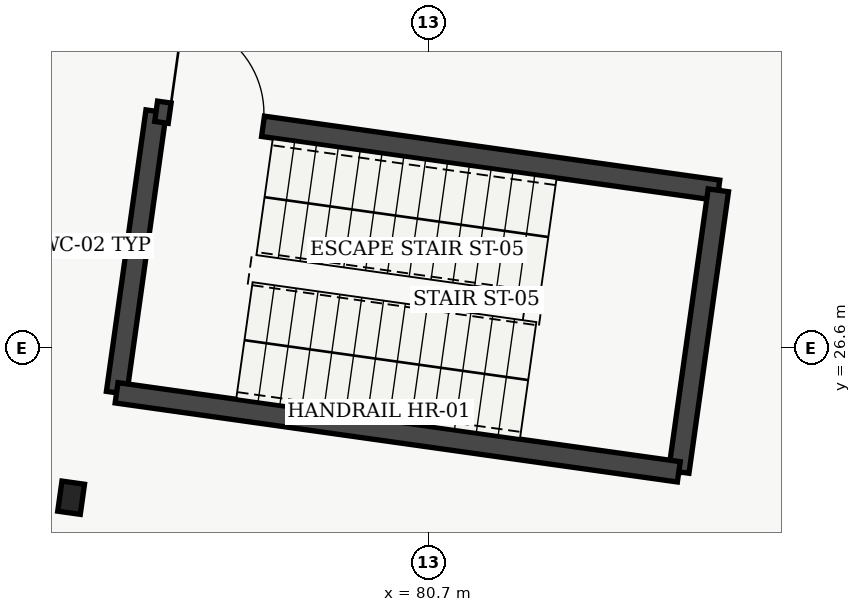
"""IFC4 building model, lengths in metres.
Left out: names, types, materials, properties, quantities, classifications, styles, units other than length and angle.
Written with IfcOpenShell. Run it as: python <this file> out.ifc"""

import sys

from ifc_helpers import new_model, si_unit, direction, frame, frame_2d, origin, origin_2d, place, context, subcontext, project, spatial, rectangle, i_section, extrude, element, fill, save


model = new_model("IFC4")
c1 = context("Model", 3, precision=1e-05, world=origin(), true_north=direction((0.0, 1.0)))
c2 = subcontext(c1, "Body", "Model", "MODEL_VIEW")
j1 = project(units=[si_unit("LENGTHUNIT", "METRE"), si_unit("PLANEANGLEUNIT", "RADIAN")], contexts=[c1])
p1 = place(None, origin())
s1 = spatial("IfcSite", under=j1, at=p1, CompositionType="ELEMENT")
p2 = place(p1, origin())
s2 = spatial("IfcBuilding", under=s1, at=p2, CompositionType="ELEMENT")
p3 = place(p2, frame((0.0, 0.0, -4.8)))
s3 = spatial("IfcBuildingStorey", under=s2, at=p3, CompositionType="ELEMENT", Elevation=-4.8)
p4 = place(p3, frame((76.002, 24.63, 0.0), z_axis=(0.0, 0.0, 1.0), x_axis=(0.990268068742, -0.13917310096, 0.0)))
e1 = element("IfcColumn", 1, at=p4, inside=s3, PredefinedType="COLUMN", context=c2, shape_type="SweptSolid", body=[
    extrude(i_section(OverallWidth=0.3, OverallDepth=0.4, WebThickness=0.013, FlangeThickness=0.024, at=origin_2d()), origin(), (0.0, 0.0, 1.0), 4.61),
])
p5 = place(p3, frame((76.6, 26.01, 0.0), z_axis=(0.0, 0.0, 1.0), x_axis=(0.139172815303, 0.990268108888, 0.0)))
e2 = element("IfcWall", 2, at=p5, inside=s3, PredefinedType="SHEAR", context=c2, shape_type="SweptSolid", body=[
    extrude(rectangle(XDim=3.74, YDim=0.27, at=frame_2d((1.87, 0.0))), origin(), (0.0, 0.0, 1.0), 4.58),
])
p6 = place(p3, frame((77.12, 29.714, 0.0), z_axis=(0.0, 0.0, 1.0), x_axis=(0.990265308789, -0.139192737628, 0.0)))
e3 = element("IfcWall", 3, at=p6, inside=s3, PredefinedType="SHEAR", context=c2, shape_type="SweptSolid", body=[
    extrude(rectangle(XDim=7.47, YDim=0.27, at=frame_2d((3.735, 0.0))), origin(), (0.0, 0.0, 1.0), 4.58),
])
p7 = place(p6, frame((0.18, 0.0, 0.0)))
e4 = element("IfcOpeningElement", 4, at=p7, cuts=e3, PredefinedType="OPENING", context=c2, shape_type="SweptSolid", body=[
    extrude(rectangle(XDim=1.24, YDim=2.15, at=frame_2d((0.62, 1.075))), frame((0.0, 0.135, 0.0), z_axis=(0.0, -1.0, 0.0), x_axis=(1.0, 0.0, 0.0)), (0.0, 0.0, 1.0), 0.27),
])
p8 = place(p3, frame((84.518, 28.674, 0.0), z_axis=(0.0, 0.0, 1.0), x_axis=(-0.139172815303, -0.990268108888, 0.0)))
e5 = element("IfcWall", 5, at=p8, inside=s3, PredefinedType="SHEAR", context=c2, shape_type="SweptSolid", body=[
    extrude(rectangle(XDim=3.74, YDim=0.27, at=frame_2d((1.87, 0.0))), origin(), (0.0, 0.0, 1.0), 4.58),
])
p9 = place(p3, frame((83.997, 24.97, 0.0), z_axis=(0.0, 0.0, 1.0), x_axis=(-0.990265308789, 0.139192737628, 0.0)))
e6 = element("IfcWall", 6, at=p9, inside=s3, PredefinedType="SHEAR", context=c2, shape_type="SweptSolid", body=[
    extrude(rectangle(XDim=7.47, YDim=0.27, at=frame_2d((3.735, 0.0))), origin(), (0.0, 0.0, 1.0), 4.58),
])
p10 = place(p7, origin())
e7 = element("IfcDoor", 7, at=p10, inside=s3, OperationType="SINGLE_SWING_LEFT", PredefinedType="DOOR", context=c2, shape_type="SweptSolid", body=[
    extrude(rectangle(XDim=1.24, YDim=2.15, at=frame_2d((0.62, 1.075))), frame((0.0, 0.025, 0.0), z_axis=(0.0, -1.0, 0.0), x_axis=(1.0, 0.0, 0.0)), (0.0, 0.0, 1.0), 0.05),
])
fill(e4, e7)
save(model, sys.argv[1])
